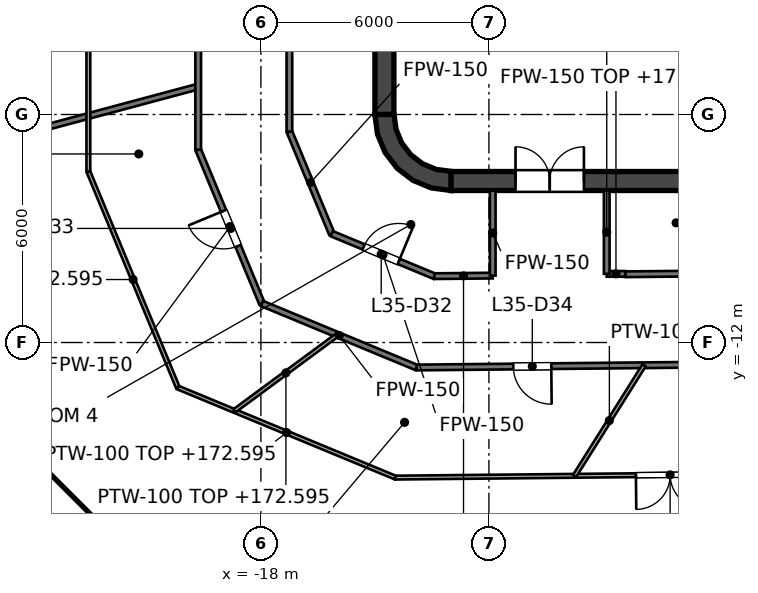
"""IFC4 building model, lengths in metres.
Left out: names, types, materials, properties, quantities, classifications, styles, units other than length and angle.
Written with IfcOpenShell. Run it as: python <this file> out.ifc"""

import sys

from ifc_helpers import new_model, si_unit, direction, frame, frame_2d, origin, place, context, subcontext, project, spatial, polyline, rectangle, outline, extrude, element, fill, save


model = new_model("IFC4")
c1 = context("Model", 3, precision=1e-05, world=origin(), true_north=direction((0.0, 1.0)))
c2 = subcontext(c1, "Body", "Model", "MODEL_VIEW")
j1 = project(units=[si_unit("LENGTHUNIT", "METRE"), si_unit("PLANEANGLEUNIT", "RADIAN")], contexts=[c1])
p1 = place(None, origin())
s1 = spatial("IfcSite", under=j1, at=p1, CompositionType="ELEMENT")
p2 = place(p1, origin())
s2 = spatial("IfcBuilding", under=s1, at=p2, CompositionType="ELEMENT")
p3 = place(p2, frame((0.0, 0.0, 169.6)))
s3 = spatial("IfcBuildingStorey", under=s2, at=p3, CompositionType="ELEMENT", Elevation=169.6)
p4 = place(p3, frame((-13.0, -7.75, 0.0), z_axis=(0.0, 0.0, 1.0), x_axis=(1.0, 0.0, 0.0)))
e1 = element("IfcWall", 1, at=p4, inside=s3, PredefinedType="SHEAR", context=c2, shape_type="SweptSolid", body=[
    extrude(rectangle(XDim=26.0, YDim=0.5, at=frame_2d((13.0, 0.0))), origin(), (0.0, 0.0, 1.0), 4.0),
])
p5 = place(p4, frame((1.7, 0.0, 0.0)))
e2 = element("IfcOpeningElement", 2, at=p5, cuts=e1, PredefinedType="OPENING", context=c2, shape_type="SweptSolid", body=[
    extrude(rectangle(XDim=1.8, YDim=2.1, at=frame_2d((0.9, 1.05))), frame((0.0, 0.25, 0.0), z_axis=(0.0, -1.0, 0.0), x_axis=(1.0, 0.0, 0.0)), (0.0, 0.0, 1.0), 0.5),
])
p6 = place(p4, frame((22.5, 0.0, 0.0)))
e3 = element("IfcOpeningElement", 3, at=p6, cuts=e1, PredefinedType="OPENING", context=c2, shape_type="SweptSolid", body=[
    extrude(rectangle(XDim=1.8, YDim=2.1, at=frame_2d((0.9, 1.05))), frame((0.0, 0.25, 0.0), z_axis=(0.0, -1.0, 0.0), x_axis=(1.0, 0.0, 0.0)), (0.0, 0.0, 1.0), 0.5),
])
p7 = place(p3, frame((-14.75, -6.0, 0.0), z_axis=(0.0, 0.0, 1.0), x_axis=(0.0, 1.0, 0.0)))
e4 = element("IfcWall", 4, at=p7, inside=s3, PredefinedType="SHEAR", context=c2, shape_type="SweptSolid", body=[
    extrude(rectangle(XDim=12.0, YDim=0.5, at=frame_2d((6.0, 0.0))), origin(), (0.0, 0.0, 1.0), 4.0),
])
p8 = place(p3, origin())
e5 = element("IfcWall", 5, at=p8, inside=s3, PredefinedType="SHEAR", context=c2, shape_type="SweptSolid", body=[
    extrude(outline(polyline([(-13.0, -8.0), (-13.0, -7.496), (-13.387, -7.445), (-13.748, -7.295), (-14.058, -7.058), (-14.295, -6.748), (-14.445, -6.387), (-14.496, -6.0), (-15.0, -6.0), (-14.932, -6.518), (-14.732, -7.0), (-14.414, -7.414), (-14.0, -7.732), (-13.518, -7.932), (-13.0, -8.0)])), origin(), (0.0, 0.0, 1.0), 4.0),
])
p9 = place(p3, frame((-9.0, -6.6, 0.0), z_axis=(0.0, 0.0, 1.0), x_axis=(0.0, 1.0, 0.0)))
e6 = element("IfcWall", 6, at=p9, inside=s3, PredefinedType="PARTITIONING", context=c2, shape_type="SweptSolid", body=[
    extrude(rectangle(XDim=2.5, YDim=0.25, at=frame_2d((1.25, 0.0))), origin(), (0.0, 0.0, 1.0), 3.85),
])
p10 = place(p9, frame((0.75, 0.0, 0.0)))
e7 = element("IfcOpeningElement", 7, at=p10, cuts=e6, PredefinedType="OPENING", context=c2, shape_type="SweptSolid", body=[
    extrude(rectangle(XDim=1.0, YDim=2.1, at=frame_2d((0.5, 1.05))), frame((0.0, 0.125, 0.0), z_axis=(0.0, -1.0, 0.0), x_axis=(1.0, 0.0, 0.0)), (0.0, 0.0, 1.0), 0.25),
])
p11 = place(p3, frame((-9.125, -7.05, 0.0), z_axis=(0.0, 0.0, 1.0), x_axis=(1.0, 0.0, 0.0)))
e8 = element("IfcWall", 8, at=p11, inside=s3, PredefinedType="SOLIDWALL", context=c2, shape_type="SweptSolid", body=[
    extrude(rectangle(XDim=18.25, YDim=0.9, at=frame_2d((9.125, 0.0))), origin(), (0.0, 0.0, 1.0), 3.85),
])
p12 = place(p3, frame((-11.8, -7.5, 0.0), z_axis=(0.0, 0.0, 1.0), x_axis=(0.0, 1.0, 0.0)))
e9 = element("IfcWall", 9, at=p12, inside=s3, PredefinedType="SOLIDWALL", context=c2, shape_type="SweptSolid", body=[
    extrude(rectangle(XDim=15.0, YDim=0.4, at=frame_2d((7.5, 0.0))), origin(), (0.0, 0.0, 1.0), 3.85),
])
p13 = place(p12, frame((11.3, 0.0, 0.0)))
e10 = element("IfcOpeningElement", 10, at=p13, cuts=e9, PredefinedType="OPENING", context=c2, shape_type="SweptSolid", body=[
    extrude(rectangle(XDim=1.1, YDim=2.1, at=frame_2d((0.55, 1.05))), frame((0.0, 0.2, 0.0), z_axis=(0.0, -1.0, 0.0), x_axis=(1.0, 0.0, 0.0)), (0.0, 0.0, 1.0), 0.4),
])
p14 = place(p12, frame((8.4, 0.0, 0.0)))
e11 = element("IfcOpeningElement", 11, at=p14, cuts=e9, PredefinedType="OPENING", context=c2, shape_type="SweptSolid", body=[
    extrude(rectangle(XDim=1.1, YDim=2.1, at=frame_2d((0.55, 1.05))), frame((0.0, 0.2, 0.0), z_axis=(0.0, -1.0, 0.0), x_axis=(1.0, 0.0, 0.0)), (0.0, 0.0, 1.0), 0.4),
])
p15 = place(p12, frame((5.5, 0.0, 0.0)))
e12 = element("IfcOpeningElement", 12, at=p15, cuts=e9, PredefinedType="OPENING", context=c2, shape_type="SweptSolid", body=[
    extrude(rectangle(XDim=1.1, YDim=2.1, at=frame_2d((0.55, 1.05))), frame((0.0, 0.2, 0.0), z_axis=(0.0, -1.0, 0.0), x_axis=(1.0, 0.0, 0.0)), (0.0, 0.0, 1.0), 0.4),
])
p16 = place(p12, frame((13.697, 0.0, 0.0)))
e13 = element("IfcOpeningElement", 13, at=p16, cuts=e9, PredefinedType="OPENING", context=c2, shape_type="SweptSolid", body=[
    extrude(rectangle(XDim=0.9, YDim=2.1, at=frame_2d((0.45, 1.05))), frame((0.0, 0.2, 0.0), z_axis=(0.0, -1.0, 0.0), x_axis=(1.0, 0.0, 0.0)), (0.0, 0.0, 1.0), 0.4),
])
p17 = place(p12, frame((0.403, 0.0, 0.0)))
e14 = element("IfcOpeningElement", 14, at=p17, cuts=e9, PredefinedType="OPENING", context=c2, shape_type="SweptSolid", body=[
    extrude(rectangle(XDim=0.9, YDim=2.1, at=frame_2d((0.45, 1.05))), frame((0.0, 0.2, 0.0), z_axis=(0.0, -1.0, 0.0), x_axis=(1.0, 0.0, 0.0)), (0.0, 0.0, 1.0), 0.4),
])
e15 = element("IfcWall", 15, at=p8, inside=s3, PredefinedType="SOLIDWALL", context=c2, shape_type="SweptSolid", body=[
    extrude(outline(polyline([(-12.0, -5.925), (-12.0, -5.675), (-14.25, -5.675), (-14.25, -3.025), (-12.0, -3.025), (-12.0, -2.775), (-14.25, -2.775), (-14.25, -0.125), (-12.0, -0.125), (-12.0, 0.125), (-14.25, 0.125), (-14.25, 2.775), (-12.0, 2.775), (-12.0, 3.025), (-14.25, 3.025), (-14.25, 5.675), (-12.0, 5.675), (-12.0, 5.925), (-14.25, 5.925), (-14.5, 5.925), (-14.5, 5.675), (-14.5, 3.025), (-14.5, 2.775), (-14.5, 0.125), (-14.5, -0.125), (-14.5, -2.775), (-14.5, -3.025), (-14.5, -5.675), (-14.5, -5.925), (-14.25, -5.925), (-12.0, -5.925)])), origin(), (0.0, 0.0, 1.0), 3.85),
])
p18 = place(p3, frame((-19.65, -6.925, 0.0), z_axis=(0.0, 0.0, 1.0), x_axis=(0.38279467838, -0.923833445056, 0.0)))
e16 = element("IfcWall", 16, at=p18, inside=s3, PredefinedType="PARTITIONING", context=c2, shape_type="SweptSolid", body=[
    extrude(rectangle(XDim=4.382, YDim=0.15, at=frame_2d((2.191, 0.0))), origin(), (0.0, 0.0, 1.0), 2.995),
])
p19 = place(p18, frame((1.744, 0.0, 0.0)))
e17 = element("IfcOpeningElement", 17, at=p19, cuts=e16, PredefinedType="OPENING", context=c2, shape_type="SweptSolid", body=[
    extrude(rectangle(XDim=1.0, YDim=2.1, at=frame_2d((0.5, 1.05))), frame((0.0, 0.075, 0.0), z_axis=(0.0, -1.0, 0.0), x_axis=(1.0, 0.0, 0.0)), (0.0, 0.0, 1.0), 0.15),
])
p20 = place(p3, frame((-17.25, -6.448, 0.0), z_axis=(0.0, 0.0, 1.0), x_axis=(0.382791482122, -0.923834769434, 0.0)))
e18 = element("IfcWall", 18, at=p20, inside=s3, PredefinedType="PARTITIONING", context=c2, shape_type="SweptSolid", body=[
    extrude(rectangle(XDim=2.91, YDim=0.15, at=frame_2d((1.455, 0.0))), origin(), (0.0, 0.0, 1.0), 2.995),
])
p21 = place(p3, frame((-17.973, -10.973, 0.0), z_axis=(0.0, 0.0, 1.0), x_axis=(0.923858763081, -0.382733570356, 0.0)))
e19 = element("IfcWall", 19, at=p21, inside=s3, PredefinedType="PARTITIONING", context=c2, shape_type="SweptSolid", body=[
    extrude(rectangle(XDim=4.405, YDim=0.15, at=frame_2d((2.203, 0.0))), origin(), (0.0, 0.0, 1.0), 2.995),
])
p22 = place(p3, frame((-16.136, -9.136, 0.0), z_axis=(0.0, 0.0, 1.0), x_axis=(0.923883401113, -0.3826740926, 0.0)))
e20 = element("IfcWall", 20, at=p22, inside=s3, PredefinedType="PARTITIONING", context=c2, shape_type="SweptSolid", body=[
    extrude(rectangle(XDim=2.921, YDim=0.15, at=frame_2d((1.461, 0.0))), origin(), (0.0, 0.0, 1.0), 2.995),
])
p23 = place(p22, frame((0.909, 0.0, 0.0)))
e21 = element("IfcOpeningElement", 21, at=p23, cuts=e20, PredefinedType="OPENING", context=c2, shape_type="SweptSolid", body=[
    extrude(rectangle(XDim=1.0, YDim=2.1, at=frame_2d((0.5, 1.05))), frame((0.0, 0.075, 0.0), z_axis=(0.0, -1.0, 0.0), x_axis=(1.0, 0.0, 0.0)), (0.0, 0.0, 1.0), 0.15),
])
p24 = place(p3, frame((-8.9, -10.194, 0.0), z_axis=(0.0, 0.0, 1.0), x_axis=(1.0, 0.0, 0.0)))
e22 = element("IfcWall", 22, at=p24, inside=s3, PredefinedType="PARTITIONING", context=c2, shape_type="SweptSolid", body=[
    extrude(rectangle(XDim=0.486, YDim=0.15, at=frame_2d((0.243, 0.0))), origin(), (0.0, 0.0, 1.0), 3.85),
])
p25 = place(p3, frame((-13.903, -12.657, 0.0), z_axis=(0.0, 0.0, 1.0), x_axis=(0.999951311207, 0.009867888089, 0.0)))
e23 = element("IfcWall", 23, at=p25, inside=s3, PredefinedType="PARTITIONING", context=c2, shape_type="SweptSolid", body=[
    extrude(rectangle(XDim=30.604, YDim=0.15, at=frame_2d((15.302, 0.0))), origin(), (0.0, 0.0, 1.0), 2.927),
])
p26 = place(p25, frame((2.544, 0.0, 0.0)))
e24 = element("IfcOpeningElement", 24, at=p26, cuts=e23, PredefinedType="OPENING", context=c2, shape_type="SweptSolid", body=[
    extrude(rectangle(XDim=1.0, YDim=2.1, at=frame_2d((0.5, 1.05))), frame((0.0, 0.075, 0.0), z_axis=(0.0, -1.0, 0.0), x_axis=(1.0, 0.0, 0.0)), (0.0, 0.0, 1.0), 0.15),
])
p27 = place(p25, frame((9.393, 0.0, 0.0)))
e25 = element("IfcOpeningElement", 25, at=p27, cuts=e23, PredefinedType="OPENING", context=c2, shape_type="SweptSolid", body=[
    extrude(rectangle(XDim=1.0, YDim=2.1, at=frame_2d((0.5, 1.05))), frame((0.0, 0.075, 0.0), z_axis=(0.0, -1.0, 0.0), x_axis=(1.0, 0.0, 0.0)), (0.0, 0.0, 1.0), 0.15),
])
p28 = place(p25, frame((14.802, 0.0, 0.0)))
e26 = element("IfcOpeningElement", 26, at=p28, cuts=e23, PredefinedType="OPENING", context=c2, shape_type="SweptSolid", body=[
    extrude(rectangle(XDim=1.0, YDim=2.1, at=frame_2d((0.5, 1.05))), frame((0.0, 0.075, 0.0), z_axis=(0.0, -1.0, 0.0), x_axis=(1.0, 0.0, 0.0)), (0.0, 0.0, 1.0), 0.15),
])
p29 = place(p25, frame((22.771, 0.0, 0.0)))
e27 = element("IfcOpeningElement", 27, at=p29, cuts=e23, PredefinedType="OPENING", context=c2, shape_type="SweptSolid", body=[
    extrude(rectangle(XDim=1.0, YDim=2.1, at=frame_2d((0.5, 1.05))), frame((0.0, 0.075, 0.0), z_axis=(0.0, -1.0, 0.0), x_axis=(1.0, 0.0, 0.0)), (0.0, 0.0, 1.0), 0.15),
])
p30 = place(p3, frame((-13.437, -10.254, 0.0), z_axis=(0.0, 0.0, 1.0), x_axis=(0.999951516679, 0.009847044796, 0.0)))
e28 = element("IfcWall", 28, at=p30, inside=s3, PredefinedType="PARTITIONING", context=c2, shape_type="SweptSolid", body=[
    extrude(rectangle(XDim=1.537, YDim=0.15, at=frame_2d((0.769, 0.0))), origin(), (0.0, 0.0, 1.0), 3.85),
])
p31 = place(p3, frame((-8.404, -10.204, 0.0), z_axis=(0.0, 0.0, 1.0), x_axis=(0.999951372491, 0.009861675993, 0.0)))
e29 = element("IfcWall", 29, at=p31, inside=s3, PredefinedType="PARTITIONING", context=c2, shape_type="SweptSolid", body=[
    extrude(rectangle(XDim=17.305, YDim=0.15, at=frame_2d((8.652, 0.0))), origin(), (0.0, 0.0, 1.0), 2.927),
])
p32 = place(p31, frame((3.702, 0.0, 0.0)))
e30 = element("IfcOpeningElement", 30, at=p32, cuts=e29, PredefinedType="OPENING", context=c2, shape_type="SweptSolid", body=[
    extrude(rectangle(XDim=1.0, YDim=2.1, at=frame_2d((0.5, 1.05))), frame((0.0, 0.075, 0.0), z_axis=(0.0, -1.0, 0.0), x_axis=(1.0, 0.0, 0.0)), (0.0, 0.0, 1.0), 0.15),
])
p33 = place(p31, frame((12.304, 0.0, 0.0)))
e31 = element("IfcOpeningElement", 31, at=p33, cuts=e29, PredefinedType="OPENING", context=c2, shape_type="SweptSolid", body=[
    extrude(rectangle(XDim=1.0, YDim=2.1, at=frame_2d((0.5, 1.05))), frame((0.0, 0.075, 0.0), z_axis=(0.0, -1.0, 0.0), x_axis=(1.0, 0.0, 0.0)), (0.0, 0.0, 1.0), 0.15),
])
p34 = place(p3, frame((-29.463, -7.895, 0.0), z_axis=(0.0, 0.0, 1.0), x_axis=(0.965899878732, 0.258915863296, 0.0)))
e32 = element("IfcWall", 32, at=p34, inside=s3, PredefinedType="PARTITIONING", context=c2, shape_type="SweptSolid", body=[
    extrude(rectangle(XDim=10.159, YDim=0.15, at=frame_2d((5.08, 0.0))), origin(), (0.0, 0.0, 1.0), 3.527),
])
p35 = place(p3, frame((-8.9, -10.194, 0.0), z_axis=(0.0, 0.0, 1.0), x_axis=(0.0, 1.0, 0.0)))
e33 = element("IfcWall", 33, at=p35, inside=s3, PredefinedType="PARTITIONING", context=c2, shape_type="SweptSolid", body=[
    extrude(rectangle(XDim=2.194, YDim=0.15, at=frame_2d((1.097, 0.0))), origin(), (0.0, 0.0, 1.0), 3.076),
])
p36 = place(p3, frame((-11.9, -10.239, 0.0), z_axis=(0.0, 0.0, 1.0), x_axis=(0.0, 1.0, 0.0)))
e34 = element("IfcWall", 34, at=p36, inside=s3, PredefinedType="PARTITIONING", context=c2, shape_type="SweptSolid", body=[
    extrude(rectangle(XDim=2.239, YDim=0.15, at=frame_2d((1.12, 0.0))), origin(), (0.0, 0.0, 1.0), 2.995),
])
p37 = place(p3, frame((-17.25, -6.448, 0.0), z_axis=(0.0, 0.0, 1.0), x_axis=(0.0, 1.0, 0.0)))
e35 = element("IfcWall", 35, at=p37, inside=s3, PredefinedType="PARTITIONING", context=c2, shape_type="SweptSolid", body=[
    extrude(rectangle(XDim=13.051, YDim=0.15, at=frame_2d((6.525, 0.0))), origin(), (0.0, 0.0, 1.0), 2.927),
])
p38 = place(p37, frame((5.843, 0.0, 0.0)))
e36 = element("IfcOpeningElement", 36, at=p38, cuts=e35, PredefinedType="OPENING", context=c2, shape_type="SweptSolid", body=[
    extrude(rectangle(XDim=1.0, YDim=2.1, at=frame_2d((0.5, 1.05))), frame((0.0, 0.075, 0.0), z_axis=(0.0, -1.0, 0.0), x_axis=(1.0, 0.0, 0.0)), (0.0, 0.0, 1.0), 0.15),
])
p39 = place(p3, frame((-19.65, -6.925, 0.0), z_axis=(0.0, 0.0, 1.0), x_axis=(0.0, 1.0, 0.0)))
e37 = element("IfcWall", 37, at=p39, inside=s3, PredefinedType="PARTITIONING", context=c2, shape_type="SweptSolid", body=[
    extrude(rectangle(XDim=14.171, YDim=0.15, at=frame_2d((7.085, 0.0))), origin(), (0.0, 0.0, 1.0), 2.927),
])
p40 = place(p39, frame((7.466, 0.0, 0.0)))
e38 = element("IfcOpeningElement", 38, at=p40, cuts=e37, PredefinedType="OPENING", context=c2, shape_type="SweptSolid", body=[
    extrude(rectangle(XDim=1.0, YDim=2.1, at=frame_2d((0.5, 1.05))), frame((0.0, 0.075, 0.0), z_axis=(0.0, -1.0, 0.0), x_axis=(1.0, 0.0, 0.0)), (0.0, 0.0, 1.0), 0.15),
])
p41 = place(p3, frame((-22.54, -7.5, 0.0), z_axis=(0.0, 0.0, 1.0), x_axis=(0.382704529509, -0.923870793506, 0.0)))
e39 = element("IfcWall", 39, at=p41, inside=s3, PredefinedType="PARTITIONING", context=c2, shape_type="SweptSolid", body=[
    extrude(rectangle(XDim=6.154, YDim=0.1, at=frame_2d((3.077, 0.0))), origin(), (0.0, 0.0, 1.0), 2.995),
])
p42 = place(p3, frame((-20.185, -13.185, 0.0), z_axis=(0.0, 0.0, 1.0), x_axis=(0.923922664945, -0.382579284857, 0.0)))
e40 = element("IfcWall", 40, at=p42, inside=s3, PredefinedType="PARTITIONING", context=c2, shape_type="SweptSolid", body=[
    extrude(rectangle(XDim=6.193, YDim=0.1, at=frame_2d((3.096, 0.0))), origin(), (0.0, 0.0, 1.0), 2.995),
])
p43 = place(p3, frame((-14.464, -15.555, 0.0), z_axis=(0.0, 0.0, 1.0), x_axis=(0.999950390242, 0.009960775811, 0.0)))
e41 = element("IfcWall", 41, at=p43, inside=s3, PredefinedType="PARTITIONING", context=c2, shape_type="SweptSolid", body=[
    extrude(rectangle(XDim=32.844, YDim=0.1, at=frame_2d((16.422, 0.0))), origin(), (0.0, 0.0, 1.0), 2.927),
])
p44 = place(p43, frame((6.333, 0.0, 0.0)))
e42 = element("IfcOpeningElement", 42, at=p44, cuts=e41, PredefinedType="OPENING", context=c2, shape_type="SweptSolid", body=[
    extrude(rectangle(XDim=1.8, YDim=2.1, at=frame_2d((0.9, 1.05))), frame((0.0, 0.05, 0.0), z_axis=(0.0, -1.0, 0.0), x_axis=(1.0, 0.0, 0.0)), (0.0, 0.0, 1.0), 0.1),
])
p45 = place(p43, frame((24.019, 0.0, 0.0)))
e43 = element("IfcOpeningElement", 43, at=p45, cuts=e41, PredefinedType="OPENING", context=c2, shape_type="SweptSolid", body=[
    extrude(rectangle(XDim=1.8, YDim=2.1, at=frame_2d((0.9, 1.05))), frame((0.0, 0.05, 0.0), z_axis=(0.0, -1.0, 0.0), x_axis=(1.0, 0.0, 0.0)), (0.0, 0.0, 1.0), 0.1),
])
p46 = place(p3, frame((-18.699, -13.8, 0.0), z_axis=(0.0, 0.0, 1.0), x_axis=(0.80472469698, 0.593648180382, 0.0)))
e44 = element("IfcWall", 44, at=p46, inside=s3, PredefinedType="PARTITIONING", context=c2, shape_type="SweptSolid", body=[
    extrude(rectangle(XDim=3.374, YDim=0.1, at=frame_2d((1.687, 0.0))), origin(), (0.0, 0.0, 1.0), 2.995),
])
p47 = place(p3, frame((-9.744, -15.508, 0.0), z_axis=(0.0, 0.0, 1.0), x_axis=(0.531972068696, 0.846761901675, 0.0)))
e45 = element("IfcWall", 45, at=p47, inside=s3, PredefinedType="PARTITIONING", context=c2, shape_type="SweptSolid", body=[
    extrude(rectangle(XDim=3.434, YDim=0.1, at=frame_2d((1.717, 0.0))), origin(), (0.0, 0.0, 1.0), 3.85),
])
p48 = place(p3, frame((-22.54, -7.5, 0.0), z_axis=(0.0, 0.0, 1.0), x_axis=(0.0, 1.0, 0.0)))
e46 = element("IfcWall", 46, at=p48, inside=s3, PredefinedType="PARTITIONING", context=c2, shape_type="SweptSolid", body=[
    extrude(rectangle(XDim=14.386, YDim=0.1, at=frame_2d((7.193, 0.0))), origin(), (0.0, 0.0, 1.0), 2.927),
])
p49 = place(p48, frame((7.473, 0.0, 0.0)))
e47 = element("IfcOpeningElement", 47, at=p49, cuts=e46, PredefinedType="OPENING", context=c2, shape_type="SweptSolid", body=[
    extrude(rectangle(XDim=0.9, YDim=2.1, at=frame_2d((0.45, 1.05))), frame((0.0, 0.05, 0.0), z_axis=(0.0, -1.0, 0.0), x_axis=(1.0, 0.0, 0.0)), (0.0, 0.0, 1.0), 0.1),
])
p50 = place(p10, origin())
e48 = element("IfcDoor", 48, at=p50, inside=s3, OperationType="SINGLE_SWING_LEFT", PredefinedType="DOOR", context=c2, shape_type="SweptSolid", body=[
    extrude(rectangle(XDim=1.0, YDim=2.1, at=frame_2d((0.5, 1.05))), frame((0.0, 0.025, 0.0), z_axis=(0.0, -1.0, 0.0), x_axis=(1.0, 0.0, 0.0)), (0.0, 0.0, 1.0), 0.05),
])
fill(e7, e48)
p51 = place(p17, origin())
e49 = element("IfcDoor", 49, at=p51, inside=s3, OperationType="SINGLE_SWING_LEFT", PredefinedType="DOOR", context=c2, shape_type="SweptSolid", body=[
    extrude(rectangle(XDim=0.9, YDim=2.1, at=frame_2d((0.45, 1.05))), frame((0.0, 0.025, 0.0), z_axis=(0.0, -1.0, 0.0), x_axis=(1.0, 0.0, 0.0)), (0.0, 0.0, 1.0), 0.05),
])
fill(e14, e49)
p52 = place(p5, origin())
e50 = element("IfcDoor", 50, at=p52, inside=s3, OperationType="DOUBLE_DOOR_SINGLE_SWING", PredefinedType="DOOR", context=c2, shape_type="SweptSolid", body=[
    extrude(rectangle(XDim=1.8, YDim=2.1, at=frame_2d((0.9, 1.05))), frame((0.0, 0.025, 0.0), z_axis=(0.0, -1.0, 0.0), x_axis=(1.0, 0.0, 0.0)), (0.0, 0.0, 1.0), 0.05),
])
fill(e2, e50)
p53 = place(p23, origin())
e51 = element("IfcDoor", 51, at=p53, inside=s3, OperationType="SINGLE_SWING_RIGHT", PredefinedType="DOOR", context=c2, shape_type="SweptSolid", body=[
    extrude(rectangle(XDim=1.0, YDim=2.1, at=frame_2d((0.5, 1.05))), frame((0.0, 0.025, 0.0), z_axis=(0.0, -1.0, 0.0), x_axis=(1.0, 0.0, 0.0)), (0.0, 0.0, 1.0), 0.05),
])
fill(e21, e51)
p54 = place(p19, origin())
e52 = element("IfcDoor", 52, at=p54, inside=s3, OperationType="SINGLE_SWING_LEFT", PredefinedType="DOOR", context=c2, shape_type="SweptSolid", body=[
    extrude(rectangle(XDim=1.0, YDim=2.1, at=frame_2d((0.5, 1.05))), frame((0.0, 0.025, 0.0), z_axis=(0.0, -1.0, 0.0), x_axis=(1.0, 0.0, 0.0)), (0.0, 0.0, 1.0), 0.05),
])
fill(e17, e52)
p55 = place(p26, origin())
e53 = element("IfcDoor", 53, at=p55, inside=s3, OperationType="SINGLE_SWING_RIGHT", PredefinedType="DOOR", context=c2, shape_type="SweptSolid", body=[
    extrude(rectangle(XDim=1.0, YDim=2.1, at=frame_2d((0.5, 1.05))), frame((0.0, 0.025, 0.0), z_axis=(0.0, -1.0, 0.0), x_axis=(1.0, 0.0, 0.0)), (0.0, 0.0, 1.0), 0.05),
])
fill(e24, e53)
p56 = place(p44, origin())
e54 = element("IfcDoor", 54, at=p56, inside=s3, OperationType="DOUBLE_DOOR_SINGLE_SWING", PredefinedType="DOOR", context=c2, shape_type="SweptSolid", body=[
    extrude(rectangle(XDim=1.8, YDim=2.1, at=frame_2d((0.9, 1.05))), frame((0.0, 0.025, 0.0), z_axis=(0.0, -1.0, 0.0), x_axis=(1.0, 0.0, 0.0)), (0.0, 0.0, 1.0), 0.05),
])
fill(e42, e54)
save(model, sys.argv[1])
